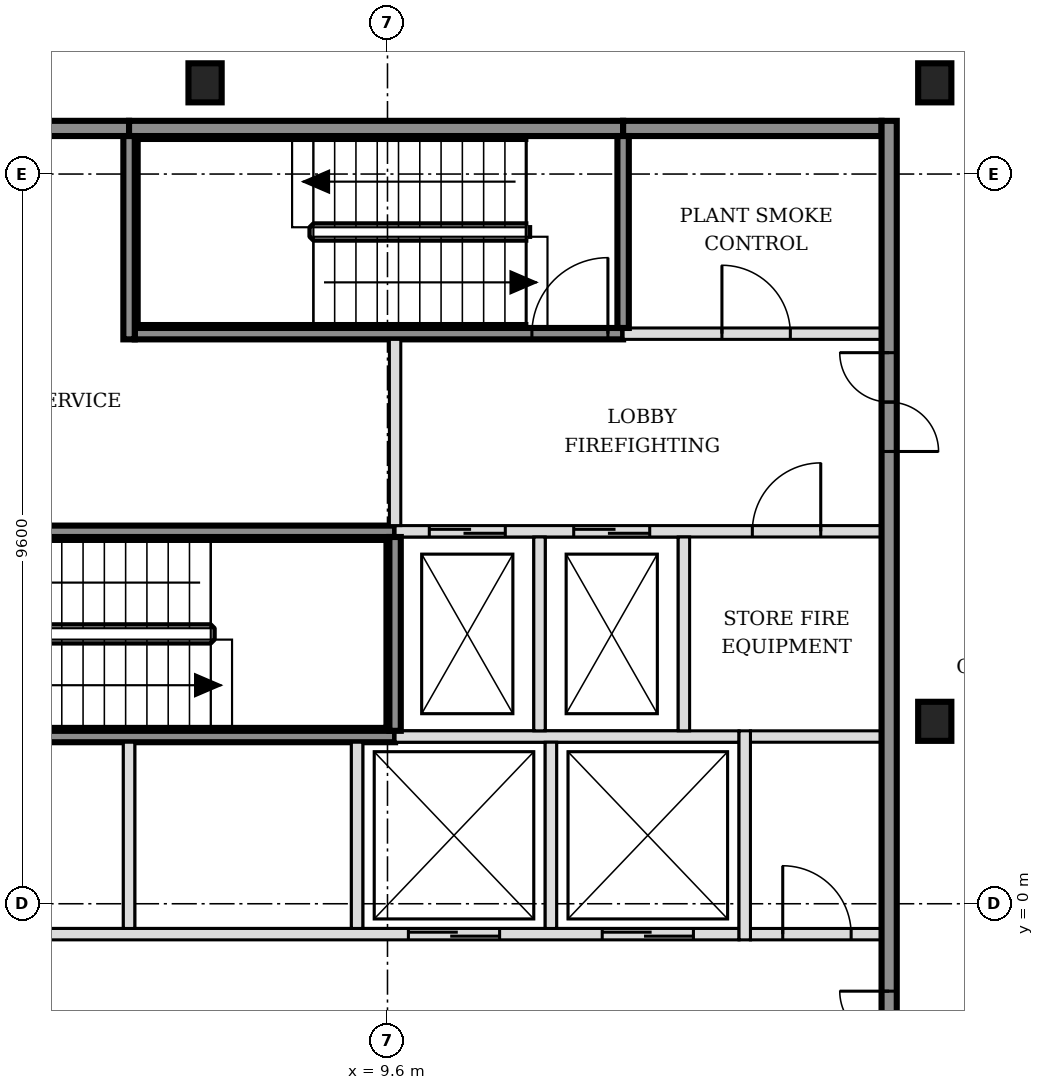
"""IFC4 building model, lengths in metres.
Left out: names, types, materials, properties, quantities, classifications, styles, units other than length and angle.
Written with IfcOpenShell. Run it as: python <this file> out.ifc"""

import sys

from ifc_helpers import new_model, si_unit, direction, frame, frame_2d, origin, origin_2d, place, context, subcontext, project, spatial, rectangle, i_section, extrude, element, fill, save


model = new_model("IFC4")
c1 = context("Model", 3, precision=1e-05, world=origin(), true_north=direction((0.0, 1.0)))
c2 = subcontext(c1, "Body", "Model", "MODEL_VIEW")
j1 = project(units=[si_unit("LENGTHUNIT", "METRE"), si_unit("PLANEANGLEUNIT", "RADIAN")], contexts=[c1])
p1 = place(None, origin())
s1 = spatial("IfcSite", under=j1, at=p1, CompositionType="ELEMENT")
p2 = place(p1, origin())
s2 = spatial("IfcBuilding", under=s1, at=p2, CompositionType="ELEMENT")
p3 = place(p2, frame((0.0, 0.0, 94.2)))
s3 = spatial("IfcBuildingStorey", under=s2, at=p3, CompositionType="ELEMENT", Elevation=94.2)
for number, where, z_axis, x_axis in (
    (1, (16.8, 2.4, -0.15), (0.0, 0.0, 1.0), (1.0, 0.0, 0.0)),
    (2, (7.2, 10.8, -0.15), (0.0, 0.0, 1.0), (1.0, 0.0, 0.0)),
    (3, (16.8, 10.8, -0.15), (0.0, 0.0, 1.0), (1.0, 0.0, 0.0)),
):
    element("IfcColumn", number, at=place(p3, frame(where, z_axis=z_axis, x_axis=x_axis)), inside=s3, PredefinedType="COLUMN", context=c2, shape_type="SweptSolid", body=[
        extrude(i_section(OverallWidth=0.437, OverallDepth=0.514, WebThickness=0.061, FlangeThickness=0.097, FilletRadius=0.015, at=origin_2d()), origin(), (0.0, 0.0, 1.0), 3.6),
    ])
p4 = place(p3, frame((-1.7, -0.4, 0.0), z_axis=(0.0, 0.0, 1.0), x_axis=(1.0, 0.0, 0.0)))
e4 = element("IfcWall", 4, at=p4, inside=s3, PredefinedType="SOLIDWALL", context=c2, shape_type="SweptSolid", body=[
    extrude(rectangle(XDim=15.925, YDim=0.15, at=frame_2d((7.962, 0.0))), origin(), (0.0, 0.0, 1.0), 3.45),
])
p5 = place(p4, frame((0.6, 0.0, 0.0)))
e5 = element("IfcOpeningElement", 5, at=p5, cuts=e4, PredefinedType="OPENING", context=c2, shape_type="SweptSolid", body=[
    extrude(rectangle(XDim=1.1, YDim=2.1, at=frame_2d((0.55, 1.05))), frame((0.0, 0.085, 0.0), z_axis=(0.0, -1.0, 0.0), x_axis=(1.0, 0.0, 0.0)), (0.0, 0.0, 1.0), 0.17),
])
p6 = place(p4, frame((3.1, 0.0, 0.0)))
e6 = element("IfcOpeningElement", 6, at=p6, cuts=e4, PredefinedType="OPENING", context=c2, shape_type="SweptSolid", body=[
    extrude(rectangle(XDim=1.1, YDim=2.1, at=frame_2d((0.55, 1.05))), frame((0.0, 0.085, 0.0), z_axis=(0.0, -1.0, 0.0), x_axis=(1.0, 0.0, 0.0)), (0.0, 0.0, 1.0), 0.17),
])
p7 = place(p4, frame((11.575, 0.0, 0.0)))
e7 = element("IfcOpeningElement", 7, at=p7, cuts=e4, PredefinedType="OPENING", context=c2, shape_type="SweptSolid", body=[
    extrude(rectangle(XDim=1.2, YDim=2.1, at=frame_2d((0.6, 1.05))), frame((0.0, 0.085, 0.0), z_axis=(0.0, -1.0, 0.0), x_axis=(1.0, 0.0, 0.0)), (0.0, 0.0, 1.0), 0.17),
])
p8 = place(p4, frame((14.125, 0.0, 0.0)))
e8 = element("IfcOpeningElement", 8, at=p8, cuts=e4, PredefinedType="OPENING", context=c2, shape_type="SweptSolid", body=[
    extrude(rectangle(XDim=1.2, YDim=2.1, at=frame_2d((0.6, 1.05))), frame((0.0, 0.085, 0.0), z_axis=(0.0, -1.0, 0.0), x_axis=(1.0, 0.0, 0.0)), (0.0, 0.0, 1.0), 0.17),
])
p9 = place(p3, frame((14.375, -0.4, 0.0), z_axis=(0.0, 0.0, 1.0), x_axis=(1.0, 0.0, 0.0)))
e9 = element("IfcWall", 9, at=p9, inside=s3, PredefinedType="PARTITIONING", context=c2, shape_type="SweptSolid", body=[
    extrude(rectangle(XDim=1.725, YDim=0.15, at=frame_2d((0.863, 0.0))), origin(), (0.0, 0.0, 1.0), 3.45),
])
p10 = place(p9, frame((0.425, 0.0, 0.0)))
e10 = element("IfcOpeningElement", 10, at=p10, cuts=e9, PredefinedType="OPENING", context=c2, shape_type="SweptSolid", body=[
    extrude(rectangle(XDim=0.9, YDim=2.1, at=frame_2d((0.45, 1.05))), frame((0.0, 0.085, 0.0), z_axis=(0.0, -1.0, 0.0), x_axis=(1.0, 0.0, 0.0)), (0.0, 0.0, 1.0), 0.17),
])
p11 = place(p3, frame((3.2, 2.2, 0.0), z_axis=(0.0, 0.0, 1.0), x_axis=(1.0, 0.0, 0.0)))
e11 = element("IfcWall", 11, at=p11, inside=s3, PredefinedType="SOLIDWALL", context=c2, shape_type="SweptSolid", body=[
    extrude(rectangle(XDim=6.5, YDim=0.15, at=frame_2d((3.25, 0.0))), origin(), (0.0, 0.0, 1.0), 3.45),
])
p12 = place(p3, frame((9.7, 2.2, 0.0), z_axis=(0.0, 0.0, 1.0), x_axis=(1.0, 0.0, 0.0)))
e12 = element("IfcWall", 12, at=p12, inside=s3, PredefinedType="SOLIDWALL", context=c2, shape_type="SweptSolid", body=[
    extrude(rectangle(XDim=4.525, YDim=0.15, at=frame_2d((2.263, 0.0))), origin(), (0.0, 0.0, 1.0), 3.45),
])
p13 = place(p3, frame((14.375, 2.2, 0.0), z_axis=(0.0, 0.0, 1.0), x_axis=(1.0, 0.0, 0.0)))
e13 = element("IfcWall", 13, at=p13, inside=s3, PredefinedType="PARTITIONING", context=c2, shape_type="SweptSolid", body=[
    extrude(rectangle(XDim=1.725, YDim=0.15, at=frame_2d((0.863, 0.0))), origin(), (0.0, 0.0, 1.0), 3.45),
])
p14 = place(p3, frame((3.275, 4.9, 0.0), z_axis=(0.0, 0.0, 1.0), x_axis=(1.0, 0.0, 0.0)))
e14 = element("IfcWall", 14, at=p14, inside=s3, PredefinedType="SOLIDWALL", context=c2, shape_type="SweptSolid", body=[
    extrude(rectangle(XDim=6.425, YDim=0.15, at=frame_2d((3.212, 0.0))), origin(), (0.0, 0.0, 1.0), 3.45),
])
p15 = place(p14, frame((0.1, 0.0, 0.0)))
e15 = element("IfcOpeningElement", 15, at=p15, cuts=e14, PredefinedType="OPENING", context=c2, shape_type="SweptSolid", body=[
    extrude(rectangle(XDim=1.0, YDim=2.1, at=frame_2d((0.5, 1.05))), frame((0.0, 0.085, 0.0), z_axis=(0.0, -1.0, 0.0), x_axis=(1.0, 0.0, 0.0)), (0.0, 0.0, 1.0), 0.17),
])
p16 = place(p3, frame((9.7, 4.9, 0.0), z_axis=(0.0, 0.0, 1.0), x_axis=(1.0, 0.0, 0.0)))
e16 = element("IfcWall", 16, at=p16, inside=s3, PredefinedType="SOLIDWALL", context=c2, shape_type="SweptSolid", body=[
    extrude(rectangle(XDim=6.4, YDim=0.15, at=frame_2d((3.2, 0.0))), origin(), (0.0, 0.0, 1.0), 3.45),
])
p17 = place(p16, frame((0.45, 0.0, 0.0)))
e17 = element("IfcOpeningElement", 17, at=p17, cuts=e16, PredefinedType="OPENING", context=c2, shape_type="SweptSolid", body=[
    extrude(rectangle(XDim=1.0, YDim=2.1, at=frame_2d((0.5, 1.05))), frame((0.0, 0.085, 0.0), z_axis=(0.0, -1.0, 0.0), x_axis=(1.0, 0.0, 0.0)), (0.0, 0.0, 1.0), 0.17),
])
p18 = place(p16, frame((2.35, 0.0, 0.0)))
e18 = element("IfcOpeningElement", 18, at=p18, cuts=e16, PredefinedType="OPENING", context=c2, shape_type="SweptSolid", body=[
    extrude(rectangle(XDim=1.0, YDim=2.1, at=frame_2d((0.5, 1.05))), frame((0.0, 0.085, 0.0), z_axis=(0.0, -1.0, 0.0), x_axis=(1.0, 0.0, 0.0)), (0.0, 0.0, 1.0), 0.17),
])
p19 = place(p16, frame((4.7, 0.0, 0.0)))
e19 = element("IfcOpeningElement", 19, at=p19, cuts=e16, PredefinedType="OPENING", context=c2, shape_type="SweptSolid", body=[
    extrude(rectangle(XDim=0.9, YDim=2.1, at=frame_2d((0.45, 1.05))), frame((0.0, 0.085, 0.0), z_axis=(0.0, -1.0, 0.0), x_axis=(1.0, 0.0, 0.0)), (0.0, 0.0, 1.0), 0.17),
])
p20 = place(p3, frame((6.275, 7.5, 0.0), z_axis=(0.0, 0.0, 1.0), x_axis=(1.0, 0.0, 0.0)))
e20 = element("IfcWall", 20, at=p20, inside=s3, PredefinedType="SOLIDWALL", context=c2, shape_type="SweptSolid", body=[
    extrude(rectangle(XDim=6.425, YDim=0.15, at=frame_2d((3.212, 0.0))), origin(), (0.0, 0.0, 1.0), 3.45),
])
p21 = place(p20, frame((5.225, 0.0, 0.0)))
e21 = element("IfcOpeningElement", 21, at=p21, cuts=e20, PredefinedType="OPENING", context=c2, shape_type="SweptSolid", body=[
    extrude(rectangle(XDim=1.0, YDim=2.1, at=frame_2d((0.5, 1.05))), frame((0.0, 0.085, 0.0), z_axis=(0.0, -1.0, 0.0), x_axis=(1.0, 0.0, 0.0)), (0.0, 0.0, 1.0), 0.17),
])
p22 = place(p3, frame((12.7, 7.5, 0.0), z_axis=(0.0, 0.0, 1.0), x_axis=(1.0, 0.0, 0.0)))
e22 = element("IfcWall", 22, at=p22, inside=s3, PredefinedType="SOLIDWALL", context=c2, shape_type="SweptSolid", body=[
    extrude(rectangle(XDim=3.4, YDim=0.15, at=frame_2d((1.7, 0.0))), origin(), (0.0, 0.0, 1.0), 3.45),
])
p23 = place(p22, frame((1.3, 0.0, 0.0)))
e23 = element("IfcOpeningElement", 23, at=p23, cuts=e22, PredefinedType="OPENING", context=c2, shape_type="SweptSolid", body=[
    extrude(rectangle(XDim=0.9, YDim=2.1, at=frame_2d((0.45, 1.05))), frame((0.0, 0.085, 0.0), z_axis=(0.0, -1.0, 0.0), x_axis=(1.0, 0.0, 0.0)), (0.0, 0.0, 1.0), 0.17),
])
p24 = place(p3, frame((-1.7, 10.2, 0.0), z_axis=(0.0, 0.0, 1.0), x_axis=(1.0, 0.0, 0.0)))
e24 = element("IfcWall", 24, at=p24, inside=s3, PredefinedType="SOLIDWALL", context=c2, shape_type="SweptSolid", body=[
    extrude(rectangle(XDim=7.9, YDim=0.2, at=frame_2d((3.95, 0.0))), origin(), (0.0, 0.0, 1.0), 3.45),
])
p25 = place(p3, frame((6.2, 10.2, 0.0), z_axis=(0.0, 0.0, 1.0), x_axis=(1.0, 0.0, 0.0)))
e25 = element("IfcWall", 25, at=p25, inside=s3, PredefinedType="SOLIDWALL", context=c2, shape_type="SweptSolid", body=[
    extrude(rectangle(XDim=6.5, YDim=0.2, at=frame_2d((3.25, 0.0))), origin(), (0.0, 0.0, 1.0), 3.45),
])
p26 = place(p3, frame((12.7, 10.2, 0.0), z_axis=(0.0, 0.0, 1.0), x_axis=(1.0, 0.0, 0.0)))
e26 = element("IfcWall", 26, at=p26, inside=s3, PredefinedType="SOLIDWALL", context=c2, shape_type="SweptSolid", body=[
    extrude(rectangle(XDim=3.4, YDim=0.2, at=frame_2d((1.7, 0.0))), origin(), (0.0, 0.0, 1.0), 3.45),
])
p27 = place(p3, frame((6.2, -0.325, 0.0), z_axis=(0.0, 0.0, 1.0), x_axis=(0.0, 1.0, 0.0)))
e27 = element("IfcWall", 27, at=p27, inside=s3, PredefinedType="SOLIDWALL", context=c2, shape_type="SweptSolid", body=[
    extrude(rectangle(XDim=2.45, YDim=0.15, at=frame_2d((1.225, 0.0))), origin(), (0.0, 0.0, 1.0), 3.45),
])
p28 = place(p3, frame((6.2, 7.425, 0.0), z_axis=(0.0, 0.0, 1.0), x_axis=(0.0, 1.0, 0.0)))
e28 = element("IfcWall", 28, at=p28, inside=s3, PredefinedType="SOLIDWALL", context=c2, shape_type="SweptSolid", body=[
    extrude(rectangle(XDim=2.675, YDim=0.15, at=frame_2d((1.337, 0.0))), origin(), (0.0, 0.0, 1.0), 3.45),
])
p29 = place(p3, frame((9.2, -0.325, 0.0), z_axis=(0.0, 0.0, 1.0), x_axis=(0.0, 1.0, 0.0)))
e29 = element("IfcWall", 29, at=p29, inside=s3, PredefinedType="SOLIDWALL", context=c2, shape_type="SweptSolid", body=[
    extrude(rectangle(XDim=2.45, YDim=0.15, at=frame_2d((1.225, 0.0))), origin(), (0.0, 0.0, 1.0), 3.45),
])
p30 = place(p3, frame((9.7, 2.275, 0.0), z_axis=(0.0, 0.0, 1.0), x_axis=(0.0, 1.0, 0.0)))
e30 = element("IfcWall", 30, at=p30, inside=s3, PredefinedType="SOLIDWALL", context=c2, shape_type="SweptSolid", body=[
    extrude(rectangle(XDim=2.55, YDim=0.15, at=frame_2d((1.275, 0.0))), origin(), (0.0, 0.0, 1.0), 3.45),
])
p31 = place(p3, frame((9.7, 4.975, 0.0), z_axis=(0.0, 0.0, 1.0), x_axis=(0.0, 1.0, 0.0)))
e31 = element("IfcWall", 31, at=p31, inside=s3, PredefinedType="SOLIDWALL", context=c2, shape_type="SweptSolid", body=[
    extrude(rectangle(XDim=2.45, YDim=0.15, at=frame_2d((1.225, 0.0))), origin(), (0.0, 0.0, 1.0), 3.45),
])
p32 = place(p3, frame((11.6, 2.275, 0.0), z_axis=(0.0, 0.0, 1.0), x_axis=(0.0, 1.0, 0.0)))
e32 = element("IfcWall", 32, at=p32, inside=s3, PredefinedType="SOLIDWALL", context=c2, shape_type="SweptSolid", body=[
    extrude(rectangle(XDim=2.55, YDim=0.15, at=frame_2d((1.275, 0.0))), origin(), (0.0, 0.0, 1.0), 3.45),
])
p33 = place(p3, frame((11.75, -0.325, 0.0), z_axis=(0.0, 0.0, 1.0), x_axis=(0.0, 1.0, 0.0)))
e33 = element("IfcWall", 33, at=p33, inside=s3, PredefinedType="SOLIDWALL", context=c2, shape_type="SweptSolid", body=[
    extrude(rectangle(XDim=2.45, YDim=0.15, at=frame_2d((1.225, 0.0))), origin(), (0.0, 0.0, 1.0), 3.45),
])
p34 = place(p3, frame((12.7, 7.575, 0.0), z_axis=(0.0, 0.0, 1.0), x_axis=(0.0, 1.0, 0.0)))
e34 = element("IfcWall", 34, at=p34, inside=s3, PredefinedType="SOLIDWALL", context=c2, shape_type="SweptSolid", body=[
    extrude(rectangle(XDim=2.525, YDim=0.15, at=frame_2d((1.263, 0.0))), origin(), (0.0, 0.0, 1.0), 3.45),
])
p35 = place(p3, frame((13.5, 2.275, 0.0), z_axis=(0.0, 0.0, 1.0), x_axis=(0.0, 1.0, 0.0)))
e35 = element("IfcWall", 35, at=p35, inside=s3, PredefinedType="SOLIDWALL", context=c2, shape_type="SweptSolid", body=[
    extrude(rectangle(XDim=2.55, YDim=0.15, at=frame_2d((1.275, 0.0))), origin(), (0.0, 0.0, 1.0), 3.45),
])
p36 = place(p3, frame((14.3, -0.475, 0.0), z_axis=(0.0, 0.0, 1.0), x_axis=(0.0, 1.0, 0.0)))
e36 = element("IfcWall", 36, at=p36, inside=s3, PredefinedType="SOLIDWALL", context=c2, shape_type="SweptSolid", body=[
    extrude(rectangle(XDim=2.75, YDim=0.15, at=frame_2d((1.375, 0.0))), origin(), (0.0, 0.0, 1.0), 3.45),
])
p37 = place(p3, frame((16.2, -5.5, 0.0), z_axis=(0.0, 0.0, 1.0), x_axis=(0.0, 1.0, 0.0)))
e37 = element("IfcWall", 37, at=p37, inside=s3, PredefinedType="SOLIDWALL", context=c2, shape_type="SweptSolid", body=[
    extrude(rectangle(XDim=15.8, YDim=0.2, at=frame_2d((7.9, 0.0))), origin(), (0.0, 0.0, 1.0), 3.45),
])
p38 = place(p37, frame((3.05, 0.0, 0.0)))
e38 = element("IfcOpeningElement", 38, at=p38, cuts=e37, PredefinedType="OPENING", context=c2, shape_type="SweptSolid", body=[
    extrude(rectangle(XDim=1.3, YDim=2.1, at=frame_2d((0.65, 1.05))), frame((0.0, 0.11, 0.0), z_axis=(0.0, -1.0, 0.0), x_axis=(1.0, 0.0, 0.0)), (0.0, 0.0, 1.0), 0.22),
])
p39 = place(p37, frame((11.45, 0.0, 0.0)))
e39 = element("IfcOpeningElement", 39, at=p39, cuts=e37, PredefinedType="OPENING", context=c2, shape_type="SweptSolid", body=[
    extrude(rectangle(XDim=1.3, YDim=2.1, at=frame_2d((0.65, 1.05))), frame((0.0, 0.11, 0.0), z_axis=(0.0, -1.0, 0.0), x_axis=(1.0, 0.0, 0.0)), (0.0, 0.0, 1.0), 0.22),
])
p40 = place(p7, origin())
e40 = element("IfcDoor", 40, at=p40, inside=s3, OperationType="DOUBLE_DOOR_SLIDING", PredefinedType="DOOR", context=c2, shape_type="SweptSolid", body=[
    extrude(rectangle(XDim=1.2, YDim=2.1, at=frame_2d((0.6, 1.05))), frame((0.0, 0.025, 0.0), z_axis=(0.0, -1.0, 0.0), x_axis=(1.0, 0.0, 0.0)), (0.0, 0.0, 1.0), 0.05),
])
fill(e7, e40)
p41 = place(p8, origin())
e41 = element("IfcDoor", 41, at=p41, inside=s3, OperationType="DOUBLE_DOOR_SLIDING", PredefinedType="DOOR", context=c2, shape_type="SweptSolid", body=[
    extrude(rectangle(XDim=1.2, YDim=2.1, at=frame_2d((0.6, 1.05))), frame((0.0, 0.025, 0.0), z_axis=(0.0, -1.0, 0.0), x_axis=(1.0, 0.0, 0.0)), (0.0, 0.0, 1.0), 0.05),
])
fill(e8, e41)
p42 = place(p17, origin())
e42 = element("IfcDoor", 42, at=p42, inside=s3, OperationType="DOUBLE_DOOR_SLIDING", PredefinedType="DOOR", context=c2, shape_type="SweptSolid", body=[
    extrude(rectangle(XDim=1.0, YDim=2.1, at=frame_2d((0.5, 1.05))), frame((0.0, 0.025, 0.0), z_axis=(0.0, -1.0, 0.0), x_axis=(1.0, 0.0, 0.0)), (0.0, 0.0, 1.0), 0.05),
])
fill(e17, e42)
p43 = place(p18, origin())
e43 = element("IfcDoor", 43, at=p43, inside=s3, OperationType="DOUBLE_DOOR_SLIDING", PredefinedType="DOOR", context=c2, shape_type="SweptSolid", body=[
    extrude(rectangle(XDim=1.0, YDim=2.1, at=frame_2d((0.5, 1.05))), frame((0.0, 0.025, 0.0), z_axis=(0.0, -1.0, 0.0), x_axis=(1.0, 0.0, 0.0)), (0.0, 0.0, 1.0), 0.05),
])
fill(e18, e43)
p44 = place(p21, origin())
e44 = element("IfcDoor", 44, at=p44, inside=s3, OperationType="SINGLE_SWING_RIGHT", PredefinedType="DOOR", context=c2, shape_type="SweptSolid", body=[
    extrude(rectangle(XDim=1.0, YDim=2.1, at=frame_2d((0.5, 1.05))), frame((0.0, 0.025, 0.0), z_axis=(0.0, -1.0, 0.0), x_axis=(1.0, 0.0, 0.0)), (0.0, 0.0, 1.0), 0.05),
])
fill(e21, e44)
p45 = place(p38, origin())
e45 = element("IfcDoor", 45, at=p45, inside=s3, OperationType="DOUBLE_DOOR_SINGLE_SWING", PredefinedType="DOOR", context=c2, shape_type="SweptSolid", body=[
    extrude(rectangle(XDim=1.3, YDim=2.1, at=frame_2d((0.65, 1.05))), frame((0.0, 0.025, 0.0), z_axis=(0.0, -1.0, 0.0), x_axis=(1.0, 0.0, 0.0)), (0.0, 0.0, 1.0), 0.05),
])
fill(e38, e45)
p46 = place(p39, origin())
e46 = element("IfcDoor", 46, at=p46, inside=s3, OperationType="DOUBLE_DOOR_SINGLE_SWING", PredefinedType="DOOR", context=c2, shape_type="SweptSolid", body=[
    extrude(rectangle(XDim=1.3, YDim=2.1, at=frame_2d((0.65, 1.05))), frame((0.0, 0.025, 0.0), z_axis=(0.0, -1.0, 0.0), x_axis=(1.0, 0.0, 0.0)), (0.0, 0.0, 1.0), 0.05),
])
fill(e39, e46)
p47 = place(p10, origin())
e47 = element("IfcDoor", 47, at=p47, inside=s3, OperationType="SINGLE_SWING_LEFT", PredefinedType="DOOR", context=c2, shape_type="SweptSolid", body=[
    extrude(rectangle(XDim=0.9, YDim=2.1, at=frame_2d((0.45, 1.05))), frame((0.0, 0.025, 0.0), z_axis=(0.0, -1.0, 0.0), x_axis=(1.0, 0.0, 0.0)), (0.0, 0.0, 1.0), 0.05),
])
fill(e10, e47)
p48 = place(p19, origin())
e48 = element("IfcDoor", 48, at=p48, inside=s3, OperationType="SINGLE_SWING_RIGHT", PredefinedType="DOOR", context=c2, shape_type="SweptSolid", body=[
    extrude(rectangle(XDim=0.9, YDim=2.1, at=frame_2d((0.45, 1.05))), frame((0.0, 0.025, 0.0), z_axis=(0.0, -1.0, 0.0), x_axis=(1.0, 0.0, 0.0)), (0.0, 0.0, 1.0), 0.05),
])
fill(e19, e48)
p49 = place(p23, origin())
e49 = element("IfcDoor", 49, at=p49, inside=s3, OperationType="SINGLE_SWING_LEFT", PredefinedType="DOOR", context=c2, shape_type="SweptSolid", body=[
    extrude(rectangle(XDim=0.9, YDim=2.1, at=frame_2d((0.45, 1.05))), frame((0.0, 0.025, 0.0), z_axis=(0.0, -1.0, 0.0), x_axis=(1.0, 0.0, 0.0)), (0.0, 0.0, 1.0), 0.05),
])
fill(e23, e49)
save(model, sys.argv[1])
